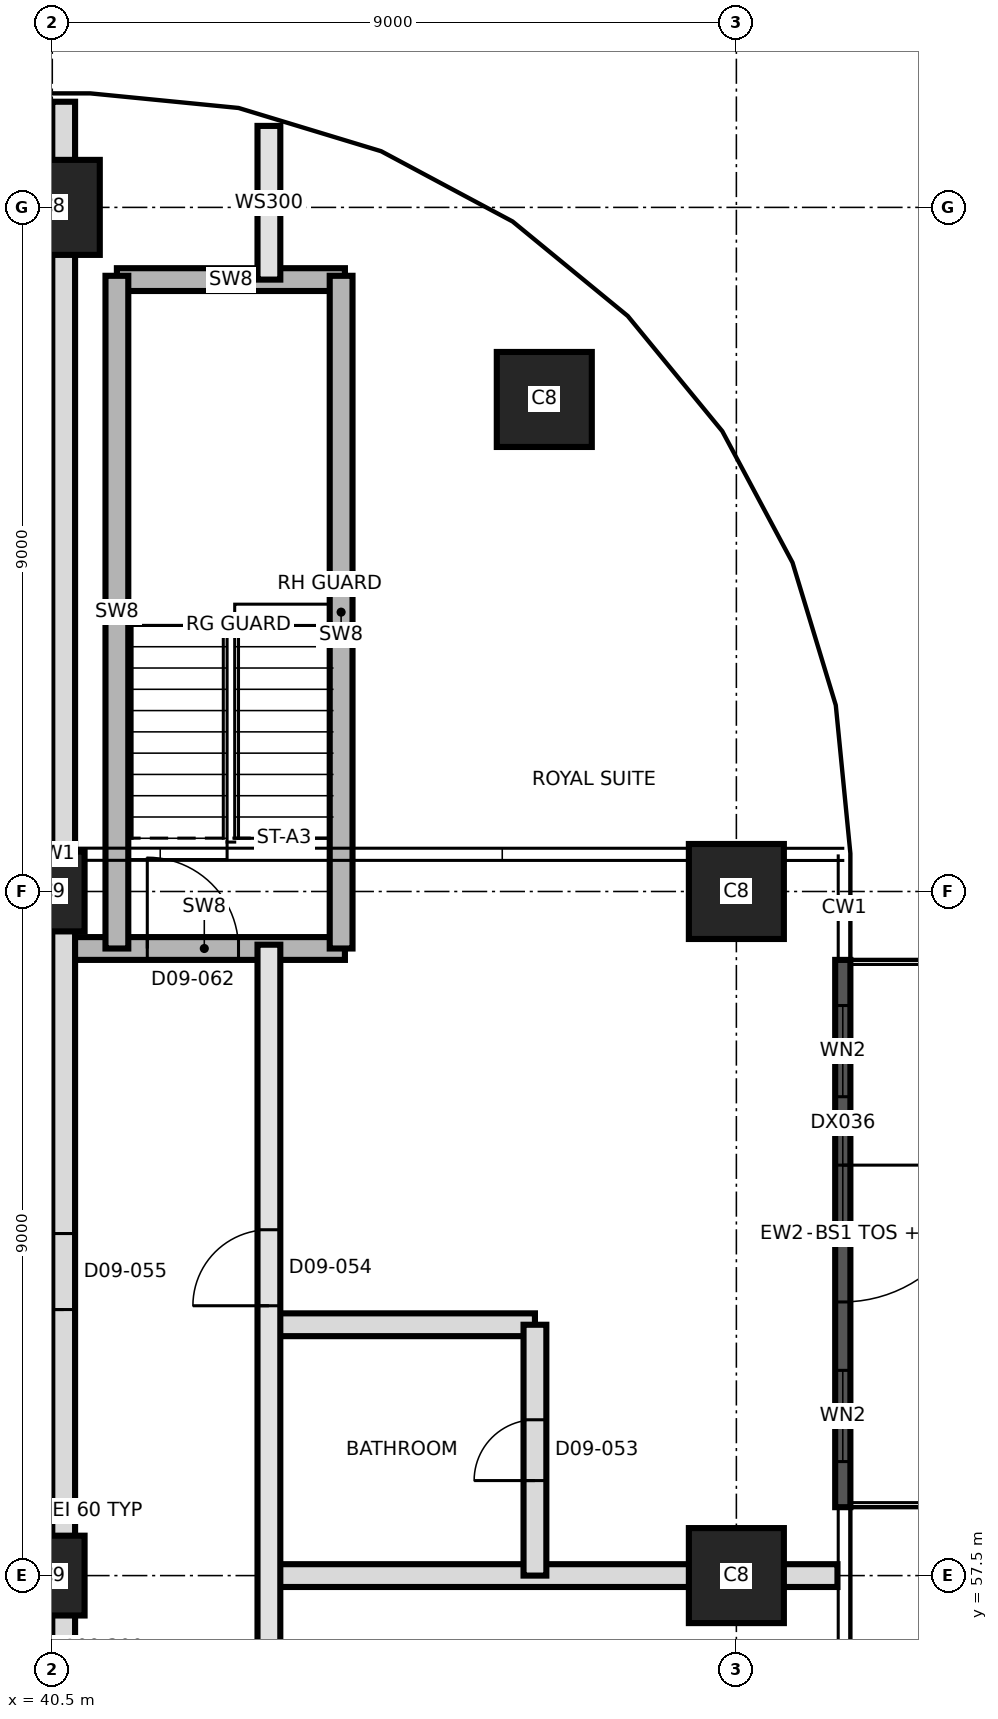
"""IFC4 building model, lengths in metres.
Left out: names, types, materials, properties, quantities, classifications, styles, units other than length and angle.
Written with IfcOpenShell. Run it as: python <this file> out.ifc"""

import sys

from ifc_helpers import new_model, si_unit, direction, frame, frame_2d, origin, origin_2d, place, context, subcontext, project, spatial, rectangle, extrude, element, fill, save


model = new_model("IFC4")
c1 = context("Model", 3, precision=1e-05, world=origin(), true_north=direction((0.0, 1.0)))
c2 = subcontext(c1, "Body", "Model", "MODEL_VIEW")
j1 = project(units=[si_unit("LENGTHUNIT", "METRE"), si_unit("PLANEANGLEUNIT", "RADIAN")], contexts=[c1])
p1 = place(None, origin())
s1 = spatial("IfcSite", under=j1, at=p1, CompositionType="ELEMENT")
p2 = place(p1, origin())
s2 = spatial("IfcBuilding", under=s1, at=p2, CompositionType="ELEMENT")
p3 = place(p2, frame((0.0, 0.0, 109.3)))
s3 = spatial("IfcBuildingStorey", under=s2, at=p3, CompositionType="ELEMENT", Elevation=109.3)
p4 = place(p3, frame((40.5, 57.5, 0.0), z_axis=(0.0, 0.0, 1.0), x_axis=(0.0, 1.0, 0.0)))
e1 = element("IfcColumn", 1, at=p4, inside=s3, PredefinedType="COLUMN", context=c2, shape_type="SweptSolid", body=[
    extrude(rectangle(XDim=1.05, YDim=0.85, at=origin_2d()), origin(), (0.0, 0.0, 1.0), 3.7),
])
p5 = place(p3, frame((49.5, 57.5, 0.0), z_axis=(0.0, 0.0, 1.0), x_axis=(1.0, 0.0, 0.0)))
e2 = element("IfcColumn", 2, at=p5, inside=s3, PredefinedType="COLUMN", context=c2, shape_type="SweptSolid", body=[
    extrude(rectangle(XDim=1.25, YDim=1.25, at=origin_2d()), origin(), (0.0, 0.0, 1.0), 3.7),
])
p6 = place(p3, frame((40.5, 66.5, 0.0), z_axis=(0.0, 0.0, 1.0), x_axis=(0.0, 1.0, 0.0)))
e3 = element("IfcColumn", 3, at=p6, inside=s3, PredefinedType="COLUMN", context=c2, shape_type="SweptSolid", body=[
    extrude(rectangle(XDim=1.05, YDim=0.85, at=origin_2d()), origin(), (0.0, 0.0, 1.0), 3.7),
])
for number, where, z_axis, x_axis in (
    (4, (49.5, 66.5, 0.0), (0.0, 0.0, 1.0), (1.0, 0.0, 0.0)),
    (5, (46.973, 72.973, 0.0), (0.0, 0.0, 1.0), (1.0, 0.0, 0.0)),
    (6, (40.5, 75.5, 0.0), (0.0, 0.0, 1.0), (1.0, 0.0, 0.0)),
):
    element("IfcColumn", number, at=place(p3, frame(where, z_axis=z_axis, x_axis=x_axis)), inside=s3, PredefinedType="COLUMN", context=c2, shape_type="SweptSolid", body=[
        extrude(rectangle(XDim=1.25, YDim=1.25, at=origin_2d()), origin(), (0.0, 0.0, 1.0), 3.7),
    ])
p7 = place(p3, frame((50.9, 65.6, 0.0), z_axis=(0.0, 0.0, 1.0), x_axis=(0.0, -1.0, 0.0)))
e7 = element("IfcWall", 7, at=p7, inside=s3, PredefinedType="SOLIDWALL", context=c2, shape_type="SweptSolid", body=[
    extrude(rectangle(XDim=7.2, YDim=0.2, at=frame_2d((3.6, 0.0))), origin(), (0.0, 0.0, 1.0), 3.4),
])
p8 = place(p7, frame((2.7, 0.0, 0.0)))
e8 = element("IfcOpeningElement", 8, at=p8, cuts=e7, PredefinedType="OPENING", context=c2, shape_type="SweptSolid", body=[
    extrude(rectangle(XDim=1.8, YDim=2.4, at=frame_2d((0.9, 1.2))), frame((0.0, 0.11, 0.0), z_axis=(0.0, -1.0, 0.0), x_axis=(1.0, 0.0, 0.0)), (0.0, 0.0, 1.0), 0.22),
])
p9 = place(p7, frame((5.4, 0.0, 0.9)))
e9 = element("IfcOpeningElement", 9, at=p9, cuts=e7, PredefinedType="OPENING", context=c2, shape_type="SweptSolid", body=[
    extrude(rectangle(XDim=1.2, YDim=2.1, at=frame_2d((0.6, 1.05))), frame((0.0, 0.11, 0.0), z_axis=(0.0, -1.0, 0.0), x_axis=(1.0, 0.0, 0.0)), (0.0, 0.0, 1.0), 0.22),
])
p10 = place(p7, frame((0.6, 0.0, 0.9)))
e10 = element("IfcOpeningElement", 10, at=p10, cuts=e7, PredefinedType="OPENING", context=c2, shape_type="SweptSolid", body=[
    extrude(rectangle(XDim=1.2, YDim=2.1, at=frame_2d((0.6, 1.05))), frame((0.0, 0.11, 0.0), z_axis=(0.0, -1.0, 0.0), x_axis=(1.0, 0.0, 0.0)), (0.0, 0.0, 1.0), 0.22),
])
p11 = place(p3, frame((30.35, 57.5, 0.0), z_axis=(0.0, 0.0, 1.0), x_axis=(1.0, 0.0, 0.0)))
e11 = element("IfcWall", 11, at=p11, inside=s3, PredefinedType="PARTITIONING", context=c2, shape_type="SweptSolid", body=[
    extrude(rectangle(XDim=10.3, YDim=0.3, at=frame_2d((5.15, 0.0))), origin(), (0.0, 0.0, 1.0), 3.4),
])
p12 = place(p3, frame((43.35, 57.5, 0.0), z_axis=(0.0, 0.0, 1.0), x_axis=(1.0, 0.0, 0.0)))
e12 = element("IfcWall", 12, at=p12, inside=s3, PredefinedType="PARTITIONING", context=c2, shape_type="SweptSolid", body=[
    extrude(rectangle(XDim=7.48, YDim=0.3, at=frame_2d((3.74, 0.0))), origin(), (0.0, 0.0, 1.0), 3.4),
])
p13 = place(p3, frame((43.35, 60.8, 0.0), z_axis=(0.0, 0.0, 1.0), x_axis=(1.0, 0.0, 0.0)))
e13 = element("IfcWall", 13, at=p13, inside=s3, PredefinedType="PARTITIONING", context=c2, shape_type="SweptSolid", body=[
    extrude(rectangle(XDim=3.5, YDim=0.3, at=frame_2d((1.75, 0.0))), origin(), (0.0, 0.0, 1.0), 3.4),
])
p14 = place(p3, frame((40.65, 65.75, 0.0), z_axis=(0.0, 0.0, 1.0), x_axis=(1.0, 0.0, 0.0)))
e14 = element("IfcWall", 14, at=p14, inside=s3, PredefinedType="SHEAR", context=c2, shape_type="SweptSolid", body=[
    extrude(rectangle(XDim=3.7, YDim=0.3, at=frame_2d((1.85, 0.0))), origin(), (0.0, 0.0, 1.0), 3.4),
])
p15 = place(p14, frame((1.1, 0.0, 0.0)))
e15 = element("IfcOpeningElement", 15, at=p15, cuts=e14, PredefinedType="OPENING", context=c2, shape_type="SweptSolid", body=[
    extrude(rectangle(XDim=1.2, YDim=2.1, at=frame_2d((0.6, 1.05))), frame((0.0, 0.16, 0.0), z_axis=(0.0, -1.0, 0.0), x_axis=(1.0, 0.0, 0.0)), (0.0, 0.0, 1.0), 0.32),
])
p16 = place(p3, frame((30.229, 68.2, 0.0), z_axis=(0.0, 0.0, 1.0), x_axis=(1.0, 0.0, 0.0)))
e16 = element("IfcWall", 16, at=p16, inside=s3, PredefinedType="PARTITIONING", context=c2, shape_type="SweptSolid", body=[
    extrude(rectangle(XDim=10.421, YDim=0.3, at=frame_2d((5.21, 0.0))), origin(), (0.0, 0.0, 1.0), 3.4),
])
p17 = place(p16, frame((4.771, 0.0, 0.0)))
e17 = element("IfcOpeningElement", 17, at=p17, cuts=e16, PredefinedType="OPENING", context=c2, shape_type="SweptSolid", body=[
    extrude(rectangle(XDim=1.0, YDim=2.1, at=frame_2d((0.5, 1.05))), frame((0.0, 0.16, 0.0), z_axis=(0.0, -1.0, 0.0), x_axis=(1.0, 0.0, 0.0)), (0.0, 0.0, 1.0), 0.32),
])
p18 = place(p3, frame((37.15, 71.5, 0.0), z_axis=(0.0, 0.0, 1.0), x_axis=(1.0, 0.0, 0.0)))
e18 = element("IfcWall", 18, at=p18, inside=s3, PredefinedType="PARTITIONING", context=c2, shape_type="SweptSolid", body=[
    extrude(rectangle(XDim=3.5, YDim=0.3, at=frame_2d((1.75, 0.0))), origin(), (0.0, 0.0, 1.0), 3.4),
])
p19 = place(p3, frame((41.35, 74.55, 0.0), z_axis=(0.0, 0.0, 1.0), x_axis=(1.0, 0.0, 0.0)))
e19 = element("IfcWall", 19, at=p19, inside=s3, PredefinedType="SHEAR", context=c2, shape_type="SweptSolid", body=[
    extrude(rectangle(XDim=3.0, YDim=0.3, at=frame_2d((1.5, 0.0))), origin(), (0.0, 0.0, 1.0), 3.4),
])
p20 = place(p3, frame((40.65, 39.8, 0.0), z_axis=(0.0, 0.0, 1.0), x_axis=(0.0, 1.0, 0.0)))
e20 = element("IfcWall", 20, at=p20, inside=s3, PredefinedType="PARTITIONING", context=c2, shape_type="SweptSolid", body=[
    extrude(rectangle(XDim=37.09, YDim=0.3, at=frame_2d((18.545, 0.0))), origin(), (0.0, 0.0, 1.0), 3.4),
])
p21 = place(p20, frame((0.835, 0.0, 0.0)))
e21 = element("IfcOpeningElement", 21, at=p21, cuts=e20, PredefinedType="OPENING", context=c2, shape_type="SweptSolid", body=[
    extrude(rectangle(XDim=1.2, YDim=2.1, at=frame_2d((0.6, 1.05))), frame((0.0, 0.16, 0.0), z_axis=(0.0, -1.0, 0.0), x_axis=(1.0, 0.0, 0.0)), (0.0, 0.0, 1.0), 0.32),
])
p22 = place(p20, frame((4.085, 0.0, 0.0)))
e22 = element("IfcOpeningElement", 22, at=p22, cuts=e20, PredefinedType="OPENING", context=c2, shape_type="SweptSolid", body=[
    extrude(rectangle(XDim=1.0, YDim=2.1, at=frame_2d((0.5, 1.05))), frame((0.0, 0.16, 0.0), z_axis=(0.0, -1.0, 0.0), x_axis=(1.0, 0.0, 0.0)), (0.0, 0.0, 1.0), 0.32),
])
p23 = place(p20, frame((11.62, 0.0, 0.0)))
e23 = element("IfcOpeningElement", 23, at=p23, cuts=e20, PredefinedType="OPENING", context=c2, shape_type="SweptSolid", body=[
    extrude(rectangle(XDim=1.0, YDim=2.4, at=frame_2d((0.5, 1.2))), frame((0.0, 0.16, 0.0), z_axis=(0.0, -1.0, 0.0), x_axis=(1.0, 0.0, 0.0)), (0.0, 0.0, 1.0), 0.32),
])
p24 = place(p20, frame((13.27, 0.0, 0.0)))
e24 = element("IfcOpeningElement", 24, at=p24, cuts=e20, PredefinedType="OPENING", context=c2, shape_type="SweptSolid", body=[
    extrude(rectangle(XDim=1.0, YDim=2.4, at=frame_2d((0.5, 1.2))), frame((0.0, 0.16, 0.0), z_axis=(0.0, -1.0, 0.0), x_axis=(1.0, 0.0, 0.0)), (0.0, 0.0, 1.0), 0.32),
])
p25 = place(p20, frame((21.2, 0.0, 0.0)))
e25 = element("IfcOpeningElement", 25, at=p25, cuts=e20, PredefinedType="OPENING", context=c2, shape_type="SweptSolid", body=[
    extrude(rectangle(XDim=1.0, YDim=2.4, at=frame_2d((0.5, 1.2))), frame((0.0, 0.16, 0.0), z_axis=(0.0, -1.0, 0.0), x_axis=(1.0, 0.0, 0.0)), (0.0, 0.0, 1.0), 0.32),
])
p26 = place(p3, frame((41.35, 65.75, 0.0), z_axis=(0.0, 0.0, 1.0), x_axis=(0.0, 1.0, 0.0)))
e26 = element("IfcWall", 26, at=p26, inside=s3, PredefinedType="SHEAR", context=c2, shape_type="SweptSolid", body=[
    extrude(rectangle(XDim=8.85, YDim=0.3, at=frame_2d((4.425, 0.0))), origin(), (0.0, 0.0, 1.0), 3.4),
])
p27 = place(p3, frame((43.35, 39.8, 0.0), z_axis=(0.0, 0.0, 1.0), x_axis=(0.0, 1.0, 0.0)))
e27 = element("IfcWall", 27, at=p27, inside=s3, PredefinedType="SOLIDWALL", context=c2, shape_type="SweptSolid", body=[
    extrude(rectangle(XDim=26.0, YDim=0.3, at=frame_2d((13.0, 0.0))), origin(), (0.0, 0.0, 1.0), 3.4),
])
p28 = place(p27, frame((2.05, 0.0, 0.0)))
e28 = element("IfcOpeningElement", 28, at=p28, cuts=e27, PredefinedType="OPENING", context=c2, shape_type="SweptSolid", body=[
    extrude(rectangle(XDim=1.0, YDim=2.4, at=frame_2d((0.5, 1.2))), frame((0.0, 0.16, 0.0), z_axis=(0.0, -1.0, 0.0), x_axis=(1.0, 0.0, 0.0)), (0.0, 0.0, 1.0), 0.32),
])
p29 = place(p27, frame((14.35, 0.0, 0.0)))
e29 = element("IfcOpeningElement", 29, at=p29, cuts=e27, PredefinedType="OPENING", context=c2, shape_type="SweptSolid", body=[
    extrude(rectangle(XDim=1.0, YDim=2.4, at=frame_2d((0.5, 1.2))), frame((0.0, 0.16, 0.0), z_axis=(0.0, -1.0, 0.0), x_axis=(1.0, 0.0, 0.0)), (0.0, 0.0, 1.0), 0.32),
])
p30 = place(p27, frame((21.25, 0.0, 0.0)))
e30 = element("IfcOpeningElement", 30, at=p30, cuts=e27, PredefinedType="OPENING", context=c2, shape_type="SweptSolid", body=[
    extrude(rectangle(XDim=1.0, YDim=2.4, at=frame_2d((0.5, 1.2))), frame((0.0, 0.16, 0.0), z_axis=(0.0, -1.0, 0.0), x_axis=(1.0, 0.0, 0.0)), (0.0, 0.0, 1.0), 0.32),
])
p31 = place(p3, frame((43.35, 74.55, 0.0), z_axis=(0.0, 0.0, 1.0), x_axis=(0.0, 1.0, 0.0)))
e31 = element("IfcWall", 31, at=p31, inside=s3, PredefinedType="SOLIDWALL", context=c2, shape_type="SweptSolid", body=[
    extrude(rectangle(XDim=2.022, YDim=0.3, at=frame_2d((1.011, 0.0))), origin(), (0.0, 0.0, 1.0), 3.4),
])
p32 = place(p3, frame((44.3, 65.75, 0.0), z_axis=(0.0, 0.0, 1.0), x_axis=(0.0, 1.0, 0.0)))
e32 = element("IfcWall", 32, at=p32, inside=s3, PredefinedType="SHEAR", context=c2, shape_type="SweptSolid", body=[
    extrude(rectangle(XDim=8.85, YDim=0.3, at=frame_2d((4.425, 0.0))), origin(), (0.0, 0.0, 1.0), 3.4),
])
p33 = place(p3, frame((46.85, 57.5, 0.0), z_axis=(0.0, 0.0, 1.0), x_axis=(0.0, 1.0, 0.0)))
e33 = element("IfcWall", 33, at=p33, inside=s3, PredefinedType="PARTITIONING", context=c2, shape_type="SweptSolid", body=[
    extrude(rectangle(XDim=3.3, YDim=0.3, at=frame_2d((1.65, 0.0))), origin(), (0.0, 0.0, 1.0), 3.4),
])
p34 = place(p33, frame((1.25, 0.0, 0.0)))
e34 = element("IfcOpeningElement", 34, at=p34, cuts=e33, PredefinedType="OPENING", context=c2, shape_type="SweptSolid", body=[
    extrude(rectangle(XDim=0.8, YDim=2.1, at=frame_2d((0.4, 1.05))), frame((0.0, 0.16, 0.0), z_axis=(0.0, -1.0, 0.0), x_axis=(1.0, 0.0, 0.0)), (0.0, 0.0, 1.0), 0.32),
])
p35 = place(p8, origin())
e35 = element("IfcDoor", 35, at=p35, inside=s3, OperationType="SINGLE_SWING_LEFT", PredefinedType="DOOR", context=c2, shape_type="SweptSolid", body=[
    extrude(rectangle(XDim=1.8, YDim=2.4, at=frame_2d((0.9, 1.2))), frame((0.0, 0.025, 0.0), z_axis=(0.0, -1.0, 0.0), x_axis=(1.0, 0.0, 0.0)), (0.0, 0.0, 1.0), 0.05),
])
fill(e8, e35)
p36 = place(p9, origin())
e36 = element("IfcWindow", 36, at=p36, inside=s3, PartitioningType="SINGLE_PANEL", PredefinedType="WINDOW", context=c2, shape_type="SweptSolid", body=[
    extrude(rectangle(XDim=1.2, YDim=2.1, at=frame_2d((0.6, 1.05))), frame((0.0, 0.03, 0.0), z_axis=(0.0, -1.0, 0.0), x_axis=(1.0, 0.0, 0.0)), (0.0, 0.0, 1.0), 0.06),
])
fill(e9, e36)
p37 = place(p10, origin())
e37 = element("IfcWindow", 37, at=p37, inside=s3, PartitioningType="SINGLE_PANEL", PredefinedType="WINDOW", context=c2, shape_type="SweptSolid", body=[
    extrude(rectangle(XDim=1.2, YDim=2.1, at=frame_2d((0.6, 1.05))), frame((0.0, 0.03, 0.0), z_axis=(0.0, -1.0, 0.0), x_axis=(1.0, 0.0, 0.0)), (0.0, 0.0, 1.0), 0.06),
])
fill(e10, e37)
p38 = place(p34, origin())
e38 = element("IfcDoor", 38, at=p38, inside=s3, OperationType="SINGLE_SWING_LEFT", PredefinedType="DOOR", context=c2, shape_type="SweptSolid", body=[
    extrude(rectangle(XDim=0.8, YDim=2.1, at=frame_2d((0.4, 1.05))), frame((0.0, 0.025, 0.0), z_axis=(0.0, -1.0, 0.0), x_axis=(1.0, 0.0, 0.0)), (0.0, 0.0, 1.0), 0.05),
])
fill(e34, e38)
p39 = place(p30, origin())
e39 = element("IfcDoor", 39, at=p39, inside=s3, OperationType="SINGLE_SWING_RIGHT", PredefinedType="DOOR", context=c2, shape_type="SweptSolid", body=[
    extrude(rectangle(XDim=1.0, YDim=2.4, at=frame_2d((0.5, 1.2))), frame((0.0, 0.025, 0.0), z_axis=(0.0, -1.0, 0.0), x_axis=(1.0, 0.0, 0.0)), (0.0, 0.0, 1.0), 0.05),
])
fill(e30, e39)
p40 = place(p25, origin())
e40 = element("IfcDoor", 40, at=p40, inside=s3, OperationType="SINGLE_SWING_LEFT", PredefinedType="DOOR", context=c2, shape_type="SweptSolid", body=[
    extrude(rectangle(XDim=1.0, YDim=2.4, at=frame_2d((0.5, 1.2))), frame((0.0, 0.025, 0.0), z_axis=(0.0, -1.0, 0.0), x_axis=(1.0, 0.0, 0.0)), (0.0, 0.0, 1.0), 0.05),
])
fill(e25, e40)
p41 = place(p15, origin())
e41 = element("IfcDoor", 41, at=p41, inside=s3, OperationType="SINGLE_SWING_RIGHT", PredefinedType="DOOR", context=c2, shape_type="SweptSolid", body=[
    extrude(rectangle(XDim=1.2, YDim=2.1, at=frame_2d((0.6, 1.05))), frame((0.0, 0.025, 0.0), z_axis=(0.0, -1.0, 0.0), x_axis=(1.0, 0.0, 0.0)), (0.0, 0.0, 1.0), 0.05),
])
fill(e15, e41)
save(model, sys.argv[1])
